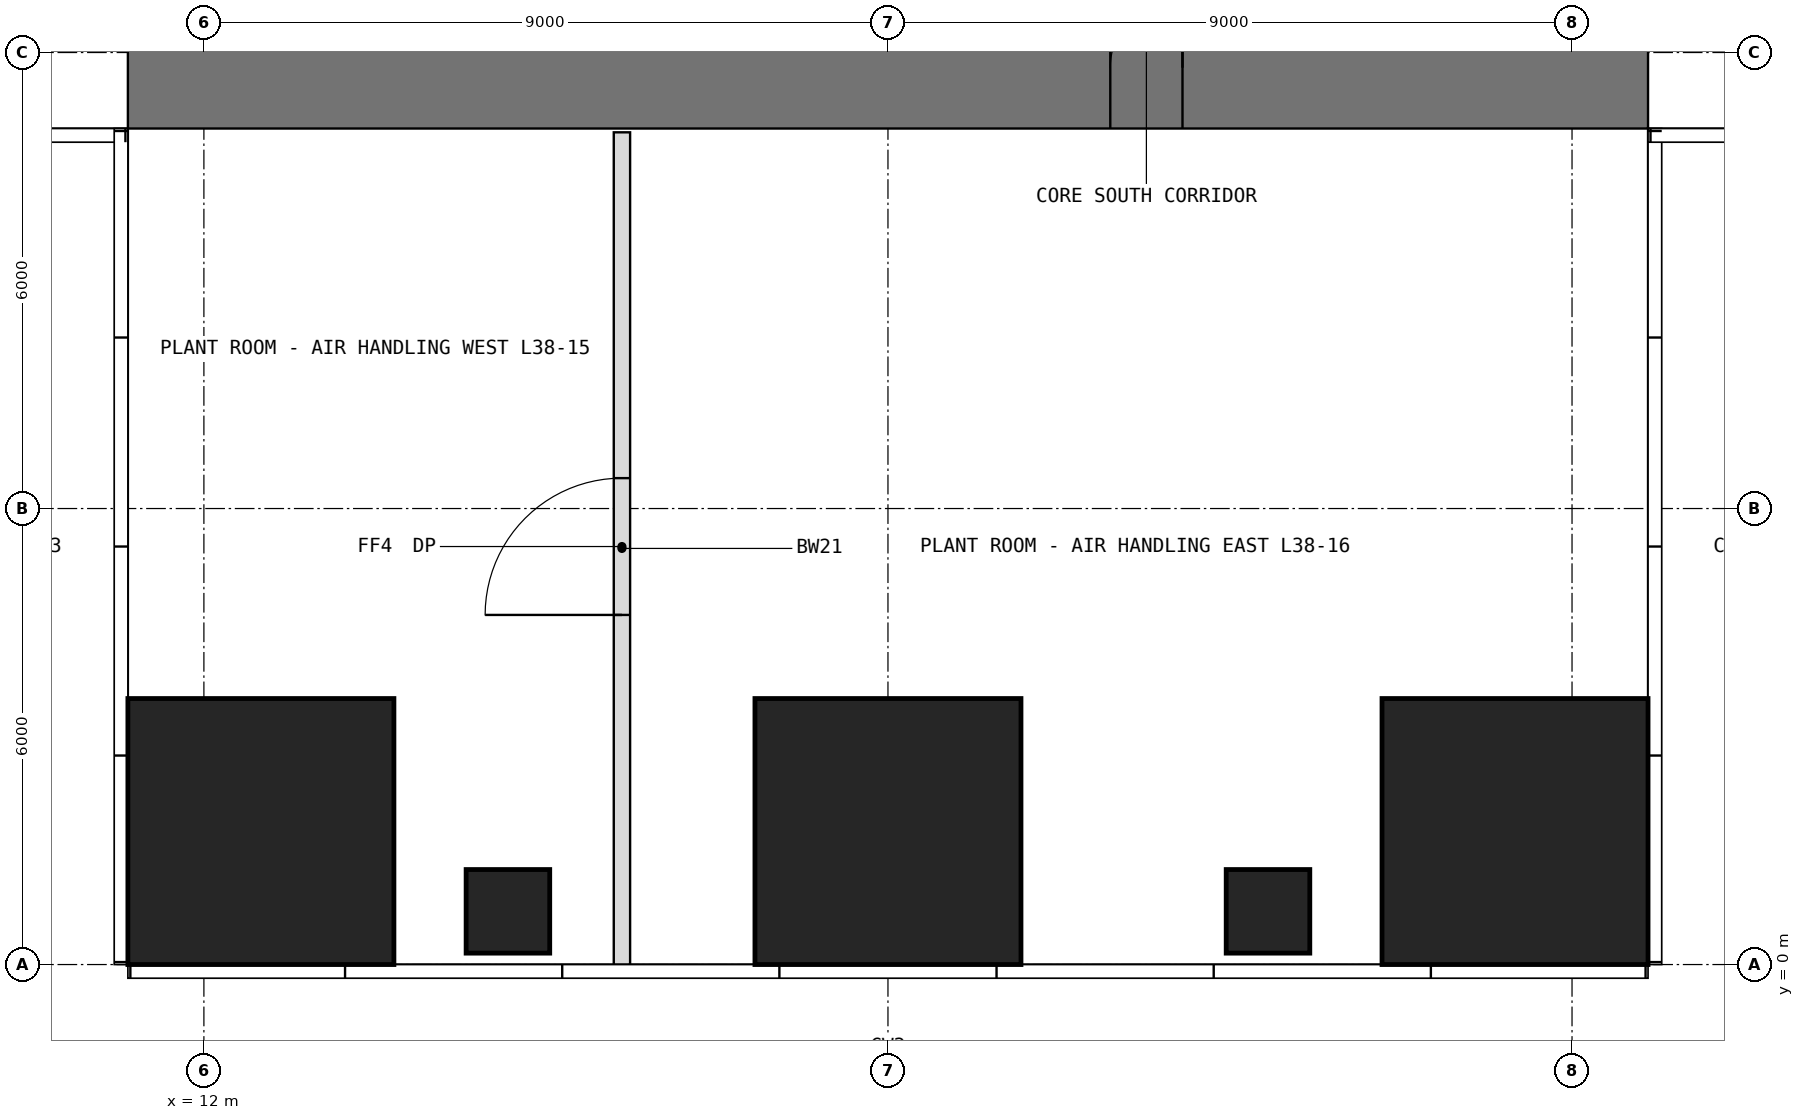
"""IFC4 building model, lengths in metres.
Left out: names, types, materials, properties, quantities, classifications, styles, units other than length and angle.
Written with IfcOpenShell. Run it as: python <this file> out.ifc"""

import sys

from ifc_helpers import new_model, si_unit, direction, frame, frame_2d, origin, origin_2d, place, context, subcontext, project, spatial, rectangle, extrude, element, fill, save


model = new_model("IFC4")
c1 = context("Model", 3, precision=1e-05, world=origin(), true_north=direction((0.0, 1.0)))
c2 = subcontext(c1, "Body", "Model", "MODEL_VIEW")
j1 = project(units=[si_unit("LENGTHUNIT", "METRE"), si_unit("PLANEANGLEUNIT", "RADIAN")], contexts=[c1])
p1 = place(None, origin())
s1 = spatial("IfcSite", under=j1, at=p1, CompositionType="ELEMENT")
p2 = place(p1, origin())
s2 = spatial("IfcBuilding", under=s1, at=p2, CompositionType="ELEMENT")
p3 = place(p2, frame((0.0, 0.0, 160.5)))
s3 = spatial("IfcBuildingStorey", under=s2, at=p3, CompositionType="ELEMENT", Elevation=160.5)
p4 = place(p3, frame((12.75, 1.75, 0.0), z_axis=(0.0, 0.0, 1.0), x_axis=(1.0, 0.0, 0.0)))
e1 = element("IfcColumn", 1, at=p4, inside=s3, PredefinedType="COLUMN", context=c2, shape_type="SweptSolid", body=[
    extrude(rectangle(XDim=3.5, YDim=3.5, at=origin_2d()), origin(), (0.0, 0.0, 1.0), 5.0),
])
p5 = place(p3, frame((16.0, 0.7, 0.0), z_axis=(0.0, 0.0, 1.0), x_axis=(1.0, 0.0, 0.0)))
e2 = element("IfcColumn", 2, at=p5, inside=s3, PredefinedType="COLUMN", context=c2, shape_type="SweptSolid", body=[
    extrude(rectangle(XDim=1.1, YDim=1.1, at=origin_2d()), origin(), (0.0, 0.0, 1.0), 5.0),
])
p6 = place(p3, frame((21.0, 1.75, 0.0), z_axis=(0.0, 0.0, 1.0), x_axis=(1.0, 0.0, 0.0)))
e3 = element("IfcColumn", 3, at=p6, inside=s3, PredefinedType="COLUMN", context=c2, shape_type="SweptSolid", body=[
    extrude(rectangle(XDim=3.5, YDim=3.5, at=origin_2d()), origin(), (0.0, 0.0, 1.0), 5.0),
])
p7 = place(p3, frame((26.0, 0.7, 0.0), z_axis=(0.0, 0.0, 1.0), x_axis=(1.0, 0.0, 0.0)))
e4 = element("IfcColumn", 4, at=p7, inside=s3, PredefinedType="COLUMN", context=c2, shape_type="SweptSolid", body=[
    extrude(rectangle(XDim=1.1, YDim=1.1, at=origin_2d()), origin(), (0.0, 0.0, 1.0), 5.0),
])
p8 = place(p3, frame((29.25, 1.75, 0.0), z_axis=(0.0, 0.0, 1.0), x_axis=(1.0, 0.0, 0.0)))
e5 = element("IfcColumn", 5, at=p8, inside=s3, PredefinedType="COLUMN", context=c2, shape_type="SweptSolid", body=[
    extrude(rectangle(XDim=3.5, YDim=3.5, at=origin_2d()), origin(), (0.0, 0.0, 1.0), 5.0),
])
p9 = place(p3, frame((11.0, 11.8, -0.25), z_axis=(0.0, 0.0, 1.0), x_axis=(1.0, 0.0, 0.0)))
e6 = element("IfcWall", 6, at=p9, inside=s3, PredefinedType="SHEAR", context=c2, shape_type="SweptSolid", body=[
    extrude(rectangle(XDim=20.0, YDim=1.6, at=frame_2d((10.0, 0.0))), origin(), (0.0, 0.0, 1.0), 5.2),
])
p10 = place(p9, frame((12.925, 0.0, 0.25)))
e7 = element("IfcOpeningElement", 7, at=p10, cuts=e6, PredefinedType="OPENING", context=c2, shape_type="SweptSolid", body=[
    extrude(rectangle(XDim=0.95, YDim=2.4, at=frame_2d((0.475, 1.2))), frame((0.0, 0.81, 0.0), z_axis=(0.0, -1.0, 0.0), x_axis=(1.0, 0.0, 0.0)), (0.0, 0.0, 1.0), 1.62),
])
p11 = place(p3, frame((17.5, 0.0, 0.0), z_axis=(0.0, 0.0, 1.0), x_axis=(0.0, 1.0, 0.0)))
e8 = element("IfcWall", 8, at=p11, inside=s3, PredefinedType="PARTITIONING", context=c2, shape_type="SweptSolid", body=[
    extrude(rectangle(XDim=10.95, YDim=0.215, at=frame_2d((5.475, 0.0))), origin(), (0.0, 0.0, 1.0), 4.75),
])
p12 = place(p11, frame((4.6, 0.0, 0.0)))
e9 = element("IfcOpeningElement", 9, at=p12, cuts=e8, PredefinedType="OPENING", context=c2, shape_type="SweptSolid", body=[
    extrude(rectangle(XDim=1.8, YDim=2.4, at=frame_2d((0.9, 1.2))), frame((0.0, 0.118, 0.0), z_axis=(0.0, -1.0, 0.0), x_axis=(1.0, 0.0, 0.0)), (0.0, 0.0, 1.0), 0.235),
])
p13 = place(p10, origin())
e10 = element("IfcDoor", 10, at=p13, inside=s3, OperationType="SINGLE_SWING_RIGHT", PredefinedType="DOOR", context=c2, shape_type="SweptSolid", body=[
    extrude(rectangle(XDim=0.95, YDim=2.4, at=frame_2d((0.475, 1.2))), frame((0.0, -0.075, 0.0), z_axis=(0.0, -1.0, 0.0), x_axis=(1.0, 0.0, 0.0)), (0.0, 0.0, 1.0), 0.05),
])
fill(e7, e10)
p14 = place(p12, origin())
e11 = element("IfcDoor", 11, at=p14, inside=s3, OperationType="DOUBLE_DOOR_SINGLE_SWING", PredefinedType="DOOR", context=c2, shape_type="SweptSolid", body=[
    extrude(rectangle(XDim=1.8, YDim=2.4, at=frame_2d((0.9, 1.2))), frame((0.0, 0.025, 0.0), z_axis=(0.0, -1.0, 0.0), x_axis=(1.0, 0.0, 0.0)), (0.0, 0.0, 1.0), 0.05),
])
fill(e9, e11)
save(model, sys.argv[1])
